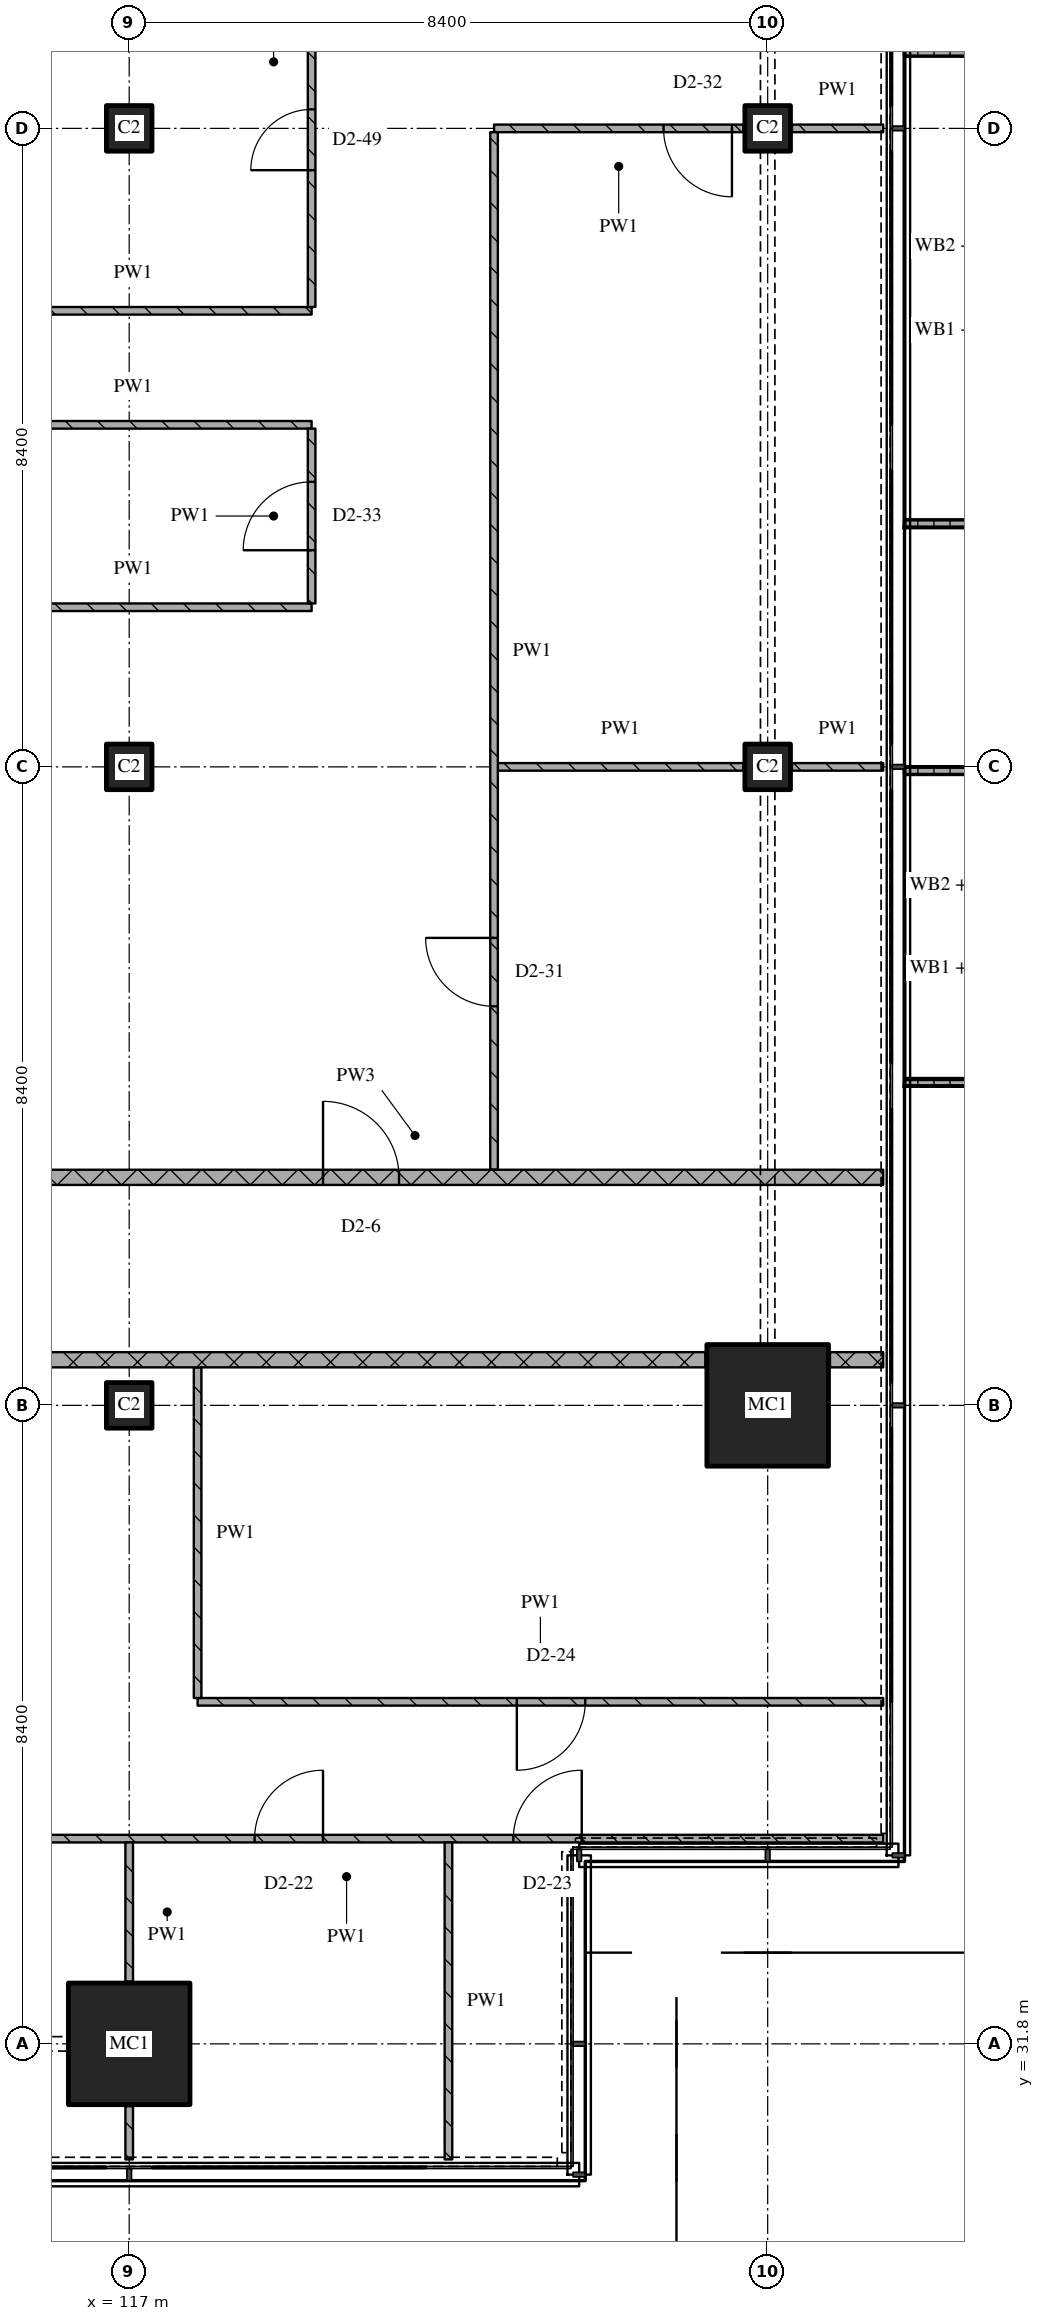
"""IFC4 building model, lengths in metres.
Left out: names, types, materials, properties, quantities, classifications, styles, units other than length and angle.
Written with IfcOpenShell. Run it as: python <this file> out.ifc"""

import sys

from ifc_helpers import new_model, si_unit, direction, frame, frame_2d, origin, origin_2d, place, context, subcontext, project, spatial, polyline, rectangle, outline, extrude, element, fill, save


model = new_model("IFC4")
c1 = context("Model", 3, precision=1e-05, world=origin(), true_north=direction((0.0, 1.0)))
c2 = subcontext(c1, "Body", "Model", "MODEL_VIEW")
j1 = project(units=[si_unit("LENGTHUNIT", "METRE"), si_unit("PLANEANGLEUNIT", "RADIAN")], contexts=[c1])
p1 = place(None, origin())
s1 = spatial("IfcSite", under=j1, at=p1, CompositionType="ELEMENT")
p2 = place(p1, origin())
s2 = spatial("IfcBuilding", under=s1, at=p2, CompositionType="ELEMENT")
p3 = place(p2, frame((0.0, 0.0, 216.3)))
s3 = spatial("IfcBuildingStorey", under=s2, at=p3, CompositionType="ELEMENT", Elevation=216.3)
p4 = place(p3, frame((117.0, 31.8, 0.0), z_axis=(0.0, 0.0, 1.0), x_axis=(1.0, 0.0, 0.0)))
e1 = element("IfcColumn", 1, at=p4, inside=s3, PredefinedType="COLUMN", context=c2, shape_type="SweptSolid", body=[
    extrude(rectangle(XDim=1.6, YDim=1.6, at=origin_2d()), origin(), (0.0, 0.0, 1.0), 3.6),
])
for number, where, z_axis, x_axis in (
    (2, (117.0, 40.2, 0.0), (0.0, 0.0, 1.0), (1.0, 0.0, 0.0)),
    (3, (117.0, 48.6, 0.0), (0.0, 0.0, 1.0), (1.0, 0.0, 0.0)),
    (4, (117.0, 57.0, 0.0), (0.0, 0.0, 1.0), (1.0, 0.0, 0.0)),
):
    element("IfcColumn", number, at=place(p3, frame(where, z_axis=z_axis, x_axis=x_axis)), inside=s3, PredefinedType="COLUMN", context=c2, shape_type="SweptSolid", body=[
        extrude(rectangle(XDim=0.6, YDim=0.6, at=origin_2d()), origin(), (0.0, 0.0, 1.0), 3.6),
    ])
p5 = place(p3, frame((125.4, 40.2, 0.0), z_axis=(0.0, 0.0, 1.0), x_axis=(1.0, 0.0, 0.0)))
e5 = element("IfcColumn", 5, at=p5, inside=s3, PredefinedType="COLUMN", context=c2, shape_type="SweptSolid", body=[
    extrude(rectangle(XDim=1.6, YDim=1.6, at=origin_2d()), origin(), (0.0, 0.0, 1.0), 3.6),
])
for number, where, z_axis, x_axis in (
    (6, (125.4, 48.6, 0.0), (0.0, 0.0, 1.0), (1.0, 0.0, 0.0)),
    (7, (125.4, 57.0, 0.0), (0.0, 0.0, 1.0), (1.0, 0.0, 0.0)),
):
    element("IfcColumn", number, at=place(p3, frame(where, z_axis=z_axis, x_axis=x_axis)), inside=s3, PredefinedType="COLUMN", context=c2, shape_type="SweptSolid", body=[
        extrude(rectangle(XDim=0.6, YDim=0.6, at=origin_2d()), origin(), (0.0, 0.0, 1.0), 3.6),
    ])
p6 = place(p3, origin())
e8 = element("IfcWall", 8, at=p6, inside=s3, PredefinedType="SOLIDWALL", context=c2, shape_type="SweptSolid", body=[
    extrude(outline(polyline([(127.2, 44.4), (127.2, 44.5), (128.833, 44.5), (128.833, 48.5), (127.2, 48.5), (127.2, 48.6), (128.933, 48.6), (128.933, 44.4), (127.2, 44.4)])), origin(), (0.0, 0.0, 1.0), 1.0),
])
p7 = place(p3, origin())
e9 = element("IfcWall", 9, at=p7, inside=s3, PredefinedType="SOLIDWALL", context=c2, shape_type="SweptSolid", body=[
    extrude(outline(polyline([(127.2, 51.75), (127.2, 51.85), (128.967, 51.85), (128.967, 57.95), (127.2, 57.95), (127.2, 58.05), (129.067, 58.05), (129.067, 51.75), (127.2, 51.75)])), origin(), (0.0, 0.0, 1.0), 1.0),
])
p8 = place(p3, frame((126.92, 34.5, 0.0), z_axis=(0.0, 0.0, 1.0), x_axis=(-1.0, 0.0, 0.0)))
e10 = element("IfcWall", 10, at=p8, inside=s3, PredefinedType="PARTITIONING", context=c2, shape_type="SweptSolid", body=[
    extrude(rectangle(XDim=14.12, YDim=0.1, at=frame_2d((7.06, 0.0))), origin(), (0.0, 0.0, 1.0), 3.32),
])
p9 = place(p8, frame((3.966, 0.0, 0.0)))
e11 = element("IfcOpeningElement", 11, at=p9, cuts=e10, PredefinedType="OPENING", context=c2, shape_type="SweptSolid", body=[
    extrude(rectangle(XDim=0.9, YDim=2.1, at=frame_2d((0.45, 1.05))), frame((0.0, 0.06, 0.0), z_axis=(0.0, -1.0, 0.0), x_axis=(1.0, 0.0, 0.0)), (0.0, 0.0, 1.0), 0.12),
])
p10 = place(p8, frame((7.37, 0.0, 0.0)))
e12 = element("IfcOpeningElement", 12, at=p10, cuts=e10, PredefinedType="OPENING", context=c2, shape_type="SweptSolid", body=[
    extrude(rectangle(XDim=0.9, YDim=2.1, at=frame_2d((0.45, 1.05))), frame((0.0, 0.06, 0.0), z_axis=(0.0, -1.0, 0.0), x_axis=(1.0, 0.0, 0.0)), (0.0, 0.0, 1.0), 0.12),
])
p11 = place(p8, frame((11.57, 0.0, 0.0)))
e13 = element("IfcOpeningElement", 13, at=p11, cuts=e10, PredefinedType="OPENING", context=c2, shape_type="SweptSolid", body=[
    extrude(rectangle(XDim=0.9, YDim=2.1, at=frame_2d((0.45, 1.05))), frame((0.0, 0.06, 0.0), z_axis=(0.0, -1.0, 0.0), x_axis=(1.0, 0.0, 0.0)), (0.0, 0.0, 1.0), 0.12),
])
p12 = place(p3, frame((117.9, 36.3, 0.0), z_axis=(0.0, 0.0, 1.0), x_axis=(1.0, 0.0, 0.0)))
e14 = element("IfcWall", 14, at=p12, inside=s3, PredefinedType="PARTITIONING", context=c2, shape_type="SweptSolid", body=[
    extrude(rectangle(XDim=9.02, YDim=0.1, at=frame_2d((4.51, 0.0))), origin(), (0.0, 0.0, 1.0), 3.32),
])
p13 = place(p12, frame((4.2, 0.0, 0.0)))
e15 = element("IfcOpeningElement", 15, at=p13, cuts=e14, PredefinedType="OPENING", context=c2, shape_type="SweptSolid", body=[
    extrude(rectangle(XDim=0.9, YDim=2.1, at=frame_2d((0.45, 1.05))), frame((0.0, 0.06, 0.0), z_axis=(0.0, -1.0, 0.0), x_axis=(1.0, 0.0, 0.0)), (0.0, 0.0, 1.0), 0.12),
])
p14 = place(p3, frame((124.58, 40.8, 0.0), z_axis=(0.0, 0.0, 1.0), x_axis=(-1.0, 0.0, 0.0)))
e16 = element("IfcWall", 16, at=p14, inside=s3, PredefinedType="PARTITIONING", context=c2, shape_type="SweptSolid", body=[
    extrude(rectangle(XDim=24.38, YDim=0.2, at=frame_2d((12.19, 0.0))), origin(), (0.0, 0.0, 1.0), 3.32),
])
p15 = place(p14, frame((14.43, 0.0, 0.0)))
e17 = element("IfcOpeningElement", 17, at=p15, cuts=e16, PredefinedType="OPENING", context=c2, shape_type="SweptSolid", body=[
    extrude(rectangle(XDim=1.0, YDim=2.1, at=frame_2d((0.5, 1.05))), frame((0.0, 0.11, 0.0), z_axis=(0.0, -1.0, 0.0), x_axis=(1.0, 0.0, 0.0)), (0.0, 0.0, 1.0), 0.22),
])
p16 = place(p3, frame((126.22, 40.8, 0.0), z_axis=(0.0, 0.0, 1.0), x_axis=(1.0, 0.0, 0.0)))
e18 = element("IfcWall", 18, at=p16, inside=s3, PredefinedType="PARTITIONING", context=c2, shape_type="SweptSolid", body=[
    extrude(rectangle(XDim=0.7, YDim=0.2, at=frame_2d((0.35, 0.0))), origin(), (0.0, 0.0, 1.0), 3.32),
])
p17 = place(p3, frame((114.6, 43.2, 0.0), z_axis=(0.0, 0.0, 1.0), x_axis=(1.0, 0.0, 0.0)))
e19 = element("IfcWall", 19, at=p17, inside=s3, PredefinedType="PARTITIONING", context=c2, shape_type="SweptSolid", body=[
    extrude(rectangle(XDim=12.32, YDim=0.2, at=frame_2d((6.16, 0.0))), origin(), (0.0, 0.0, 1.0), 3.32),
])
p18 = place(p17, frame((4.95, 0.0, 0.0)))
e20 = element("IfcOpeningElement", 20, at=p18, cuts=e19, PredefinedType="OPENING", context=c2, shape_type="SweptSolid", body=[
    extrude(rectangle(XDim=1.0, YDim=2.1, at=frame_2d((0.5, 1.05))), frame((0.0, 0.11, 0.0), z_axis=(0.0, -1.0, 0.0), x_axis=(1.0, 0.0, 0.0)), (0.0, 0.0, 1.0), 0.22),
])
p19 = place(p3, frame((121.85, 48.6, 0.0), z_axis=(0.0, 0.0, 1.0), x_axis=(1.0, 0.0, 0.0)))
e21 = element("IfcWall", 21, at=p19, inside=s3, PredefinedType="PARTITIONING", context=c2, shape_type="SweptSolid", body=[
    extrude(rectangle(XDim=3.23, YDim=0.1, at=frame_2d((1.615, 0.0))), origin(), (0.0, 0.0, 1.0), 3.32),
])
p20 = place(p3, frame((125.72, 48.6, 0.0), z_axis=(0.0, 0.0, 1.0), x_axis=(1.0, 0.0, 0.0)))
e22 = element("IfcWall", 22, at=p20, inside=s3, PredefinedType="PARTITIONING", context=c2, shape_type="SweptSolid", body=[
    extrude(rectangle(XDim=1.2, YDim=0.1, at=frame_2d((0.6, 0.0))), origin(), (0.0, 0.0, 1.0), 3.32),
])
for number, where, z_axis, x_axis in (
    (23, (114.7, 50.7, 0.0), (0.0, 0.0, 1.0), (1.0, 0.0, 0.0)),
    (24, (114.7, 53.1, 0.0), (0.0, 0.0, 1.0), (1.0, 0.0, 0.0)),
    (25, (114.7, 54.6, 0.0), (0.0, 0.0, 1.0), (1.0, 0.0, 0.0)),
):
    element("IfcWall", number, at=place(p3, frame(where, z_axis=z_axis, x_axis=x_axis)), inside=s3, PredefinedType="PARTITIONING", context=c2, shape_type="SweptSolid", body=[
        extrude(rectangle(XDim=4.7, YDim=0.1, at=frame_2d((2.35, 0.0))), origin(), (0.0, 0.0, 1.0), 3.32),
    ])
p21 = place(p3, frame((125.08, 57.0, 0.0), z_axis=(0.0, 0.0, 1.0), x_axis=(-1.0, 0.0, 0.0)))
e26 = element("IfcWall", 26, at=p21, inside=s3, PredefinedType="PARTITIONING", context=c2, shape_type="SweptSolid", body=[
    extrude(rectangle(XDim=3.28, YDim=0.1, at=frame_2d((1.64, 0.0))), origin(), (0.0, 0.0, 1.0), 3.32),
])
p22 = place(p21, frame((0.15, 0.0, 0.0)))
e27 = element("IfcOpeningElement", 27, at=p22, cuts=e26, PredefinedType="OPENING", context=c2, shape_type="SweptSolid", body=[
    extrude(rectangle(XDim=0.9, YDim=2.1, at=frame_2d((0.45, 1.05))), frame((0.0, 0.06, 0.0), z_axis=(0.0, -1.0, 0.0), x_axis=(1.0, 0.0, 0.0)), (0.0, 0.0, 1.0), 0.12),
])
p23 = place(p3, frame((125.72, 57.0, 0.0), z_axis=(0.0, 0.0, 1.0), x_axis=(1.0, 0.0, 0.0)))
e28 = element("IfcWall", 28, at=p23, inside=s3, PredefinedType="PARTITIONING", context=c2, shape_type="SweptSolid", body=[
    extrude(rectangle(XDim=1.2, YDim=0.1, at=frame_2d((0.6, 0.0))), origin(), (0.0, 0.0, 1.0), 3.32),
])
p24 = place(p3, frame((117.0, 30.98, 0.0), z_axis=(0.0, 0.0, 1.0), x_axis=(0.0, -1.0, 0.0)))
e29 = element("IfcWall", 29, at=p24, inside=s3, PredefinedType="PARTITIONING", context=c2, shape_type="SweptSolid", body=[
    extrude(rectangle(XDim=0.7, YDim=0.1, at=frame_2d((0.35, 0.0))), origin(), (0.0, 0.0, 1.0), 3.32),
])
p25 = place(p3, frame((117.0, 34.45, 0.0), z_axis=(0.0, 0.0, 1.0), x_axis=(0.0, -1.0, 0.0)))
e30 = element("IfcWall", 30, at=p25, inside=s3, PredefinedType="PARTITIONING", context=c2, shape_type="SweptSolid", body=[
    extrude(rectangle(XDim=1.83, YDim=0.1, at=frame_2d((0.915, 0.0))), origin(), (0.0, 0.0, 1.0), 3.32),
])
p26 = place(p3, frame((117.9, 40.7, 0.0), z_axis=(0.0, 0.0, 1.0), x_axis=(0.0, -1.0, 0.0)))
e31 = element("IfcWall", 31, at=p26, inside=s3, PredefinedType="PARTITIONING", context=c2, shape_type="SweptSolid", body=[
    extrude(rectangle(XDim=4.35, YDim=0.1, at=frame_2d((2.175, 0.0))), origin(), (0.0, 0.0, 1.0), 3.32),
])
p27 = place(p3, frame((119.4, 50.75, 0.0), z_axis=(0.0, 0.0, 1.0), x_axis=(0.0, 1.0, 0.0)))
e32 = element("IfcWall", 32, at=p27, inside=s3, PredefinedType="PARTITIONING", context=c2, shape_type="SweptSolid", body=[
    extrude(rectangle(XDim=2.3, YDim=0.1, at=frame_2d((1.15, 0.0))), origin(), (0.0, 0.0, 1.0), 3.32),
])
p28 = place(p27, frame((0.7, 0.0, 0.0)))
e33 = element("IfcOpeningElement", 33, at=p28, cuts=e32, PredefinedType="OPENING", context=c2, shape_type="SweptSolid", body=[
    extrude(rectangle(XDim=0.9, YDim=2.1, at=frame_2d((0.45, 1.05))), frame((0.0, 0.06, 0.0), z_axis=(0.0, -1.0, 0.0), x_axis=(1.0, 0.0, 0.0)), (0.0, 0.0, 1.0), 0.12),
])
p29 = place(p3, frame((119.4, 54.65, 0.0), z_axis=(0.0, 0.0, 1.0), x_axis=(0.0, 1.0, 0.0)))
e34 = element("IfcWall", 34, at=p29, inside=s3, PredefinedType="PARTITIONING", context=c2, shape_type="SweptSolid", body=[
    extrude(rectangle(XDim=6.45, YDim=0.1, at=frame_2d((3.225, 0.0))), origin(), (0.0, 0.0, 1.0), 3.32),
])
p30 = place(p29, frame((1.8, 0.0, 0.0)))
e35 = element("IfcOpeningElement", 35, at=p30, cuts=e34, PredefinedType="OPENING", context=c2, shape_type="SweptSolid", body=[
    extrude(rectangle(XDim=0.8, YDim=2.1, at=frame_2d((0.4, 1.05))), frame((0.0, 0.06, 0.0), z_axis=(0.0, -1.0, 0.0), x_axis=(1.0, 0.0, 0.0)), (0.0, 0.0, 1.0), 0.12),
])
p31 = place(p29, frame((5.1, 0.0, 0.0)))
e36 = element("IfcOpeningElement", 36, at=p31, cuts=e34, PredefinedType="OPENING", context=c2, shape_type="SweptSolid", body=[
    extrude(rectangle(XDim=0.8, YDim=2.1, at=frame_2d((0.4, 1.05))), frame((0.0, 0.06, 0.0), z_axis=(0.0, -1.0, 0.0), x_axis=(1.0, 0.0, 0.0)), (0.0, 0.0, 1.0), 0.12),
])
p32 = place(p3, frame((121.2, 34.45, 0.0), z_axis=(0.0, 0.0, 1.0), x_axis=(0.0, -1.0, 0.0)))
e37 = element("IfcWall", 37, at=p32, inside=s3, PredefinedType="PARTITIONING", context=c2, shape_type="SweptSolid", body=[
    extrude(rectangle(XDim=4.17, YDim=0.1, at=frame_2d((2.085, 0.0))), origin(), (0.0, 0.0, 1.0), 3.32),
])
p33 = place(p3, frame((121.8, 56.95, 0.0), z_axis=(0.0, 0.0, 1.0), x_axis=(0.0, -1.0, 0.0)))
e38 = element("IfcWall", 38, at=p33, inside=s3, PredefinedType="PARTITIONING", context=c2, shape_type="SweptSolid", body=[
    extrude(rectangle(XDim=13.65, YDim=0.1, at=frame_2d((6.825, 0.0))), origin(), (0.0, 0.0, 1.0), 3.32),
])
p34 = place(p33, frame((10.6, 0.0, 0.0)))
e39 = element("IfcOpeningElement", 39, at=p34, cuts=e38, PredefinedType="OPENING", context=c2, shape_type="SweptSolid", body=[
    extrude(rectangle(XDim=0.9, YDim=2.1, at=frame_2d((0.45, 1.05))), frame((0.0, 0.06, 0.0), z_axis=(0.0, -1.0, 0.0), x_axis=(1.0, 0.0, 0.0)), (0.0, 0.0, 1.0), 0.12),
])
p35 = place(p9, origin())
e40 = element("IfcDoor", 40, at=p35, inside=s3, OperationType="SINGLE_SWING_RIGHT", PredefinedType="DOOR", context=c2, shape_type="SweptSolid", body=[
    extrude(rectangle(XDim=0.9, YDim=2.1, at=frame_2d((0.45, 1.05))), frame((0.0, 0.025, 0.0), z_axis=(0.0, -1.0, 0.0), x_axis=(1.0, 0.0, 0.0)), (0.0, 0.0, 1.0), 0.05),
])
fill(e11, e40)
p36 = place(p10, origin())
e41 = element("IfcDoor", 41, at=p36, inside=s3, OperationType="SINGLE_SWING_RIGHT", PredefinedType="DOOR", context=c2, shape_type="SweptSolid", body=[
    extrude(rectangle(XDim=0.9, YDim=2.1, at=frame_2d((0.45, 1.05))), frame((0.0, 0.025, 0.0), z_axis=(0.0, -1.0, 0.0), x_axis=(1.0, 0.0, 0.0)), (0.0, 0.0, 1.0), 0.05),
])
fill(e12, e41)
p37 = place(p13, origin())
e42 = element("IfcDoor", 42, at=p37, inside=s3, OperationType="SINGLE_SWING_RIGHT", PredefinedType="DOOR", context=c2, shape_type="SweptSolid", body=[
    extrude(rectangle(XDim=0.9, YDim=2.1, at=frame_2d((0.45, 1.05))), frame((0.0, 0.025, 0.0), z_axis=(0.0, -1.0, 0.0), x_axis=(1.0, 0.0, 0.0)), (0.0, 0.0, 1.0), 0.05),
])
fill(e15, e42)
p38 = place(p18, origin())
e43 = element("IfcDoor", 43, at=p38, inside=s3, OperationType="SINGLE_SWING_LEFT", PredefinedType="DOOR", context=c2, shape_type="SweptSolid", body=[
    extrude(rectangle(XDim=1.0, YDim=2.1, at=frame_2d((0.5, 1.05))), frame((0.0, 0.025, 0.0), z_axis=(0.0, -1.0, 0.0), x_axis=(1.0, 0.0, 0.0)), (0.0, 0.0, 1.0), 0.05),
])
fill(e20, e43)
p39 = place(p22, origin())
e44 = element("IfcDoor", 44, at=p39, inside=s3, OperationType="SINGLE_SWING_LEFT", PredefinedType="DOOR", context=c2, shape_type="SweptSolid", body=[
    extrude(rectangle(XDim=0.9, YDim=2.1, at=frame_2d((0.45, 1.05))), frame((0.0, 0.025, 0.0), z_axis=(0.0, -1.0, 0.0), x_axis=(1.0, 0.0, 0.0)), (0.0, 0.0, 1.0), 0.05),
])
fill(e27, e44)
p40 = place(p28, origin())
e45 = element("IfcDoor", 45, at=p40, inside=s3, OperationType="SINGLE_SWING_LEFT", PredefinedType="DOOR", context=c2, shape_type="SweptSolid", body=[
    extrude(rectangle(XDim=0.9, YDim=2.1, at=frame_2d((0.45, 1.05))), frame((0.0, 0.025, 0.0), z_axis=(0.0, -1.0, 0.0), x_axis=(1.0, 0.0, 0.0)), (0.0, 0.0, 1.0), 0.05),
])
fill(e33, e45)
p41 = place(p30, origin())
e46 = element("IfcDoor", 46, at=p41, inside=s3, OperationType="SINGLE_SWING_LEFT", PredefinedType="DOOR", context=c2, shape_type="SweptSolid", body=[
    extrude(rectangle(XDim=0.8, YDim=2.1, at=frame_2d((0.4, 1.05))), frame((0.0, 0.025, 0.0), z_axis=(0.0, -1.0, 0.0), x_axis=(1.0, 0.0, 0.0)), (0.0, 0.0, 1.0), 0.05),
])
fill(e35, e46)
p42 = place(p34, origin())
e47 = element("IfcDoor", 47, at=p42, inside=s3, OperationType="SINGLE_SWING_RIGHT", PredefinedType="DOOR", context=c2, shape_type="SweptSolid", body=[
    extrude(rectangle(XDim=0.9, YDim=2.1, at=frame_2d((0.45, 1.05))), frame((0.0, 0.025, 0.0), z_axis=(0.0, -1.0, 0.0), x_axis=(1.0, 0.0, 0.0)), (0.0, 0.0, 1.0), 0.05),
])
fill(e39, e47)
save(model, sys.argv[1])
